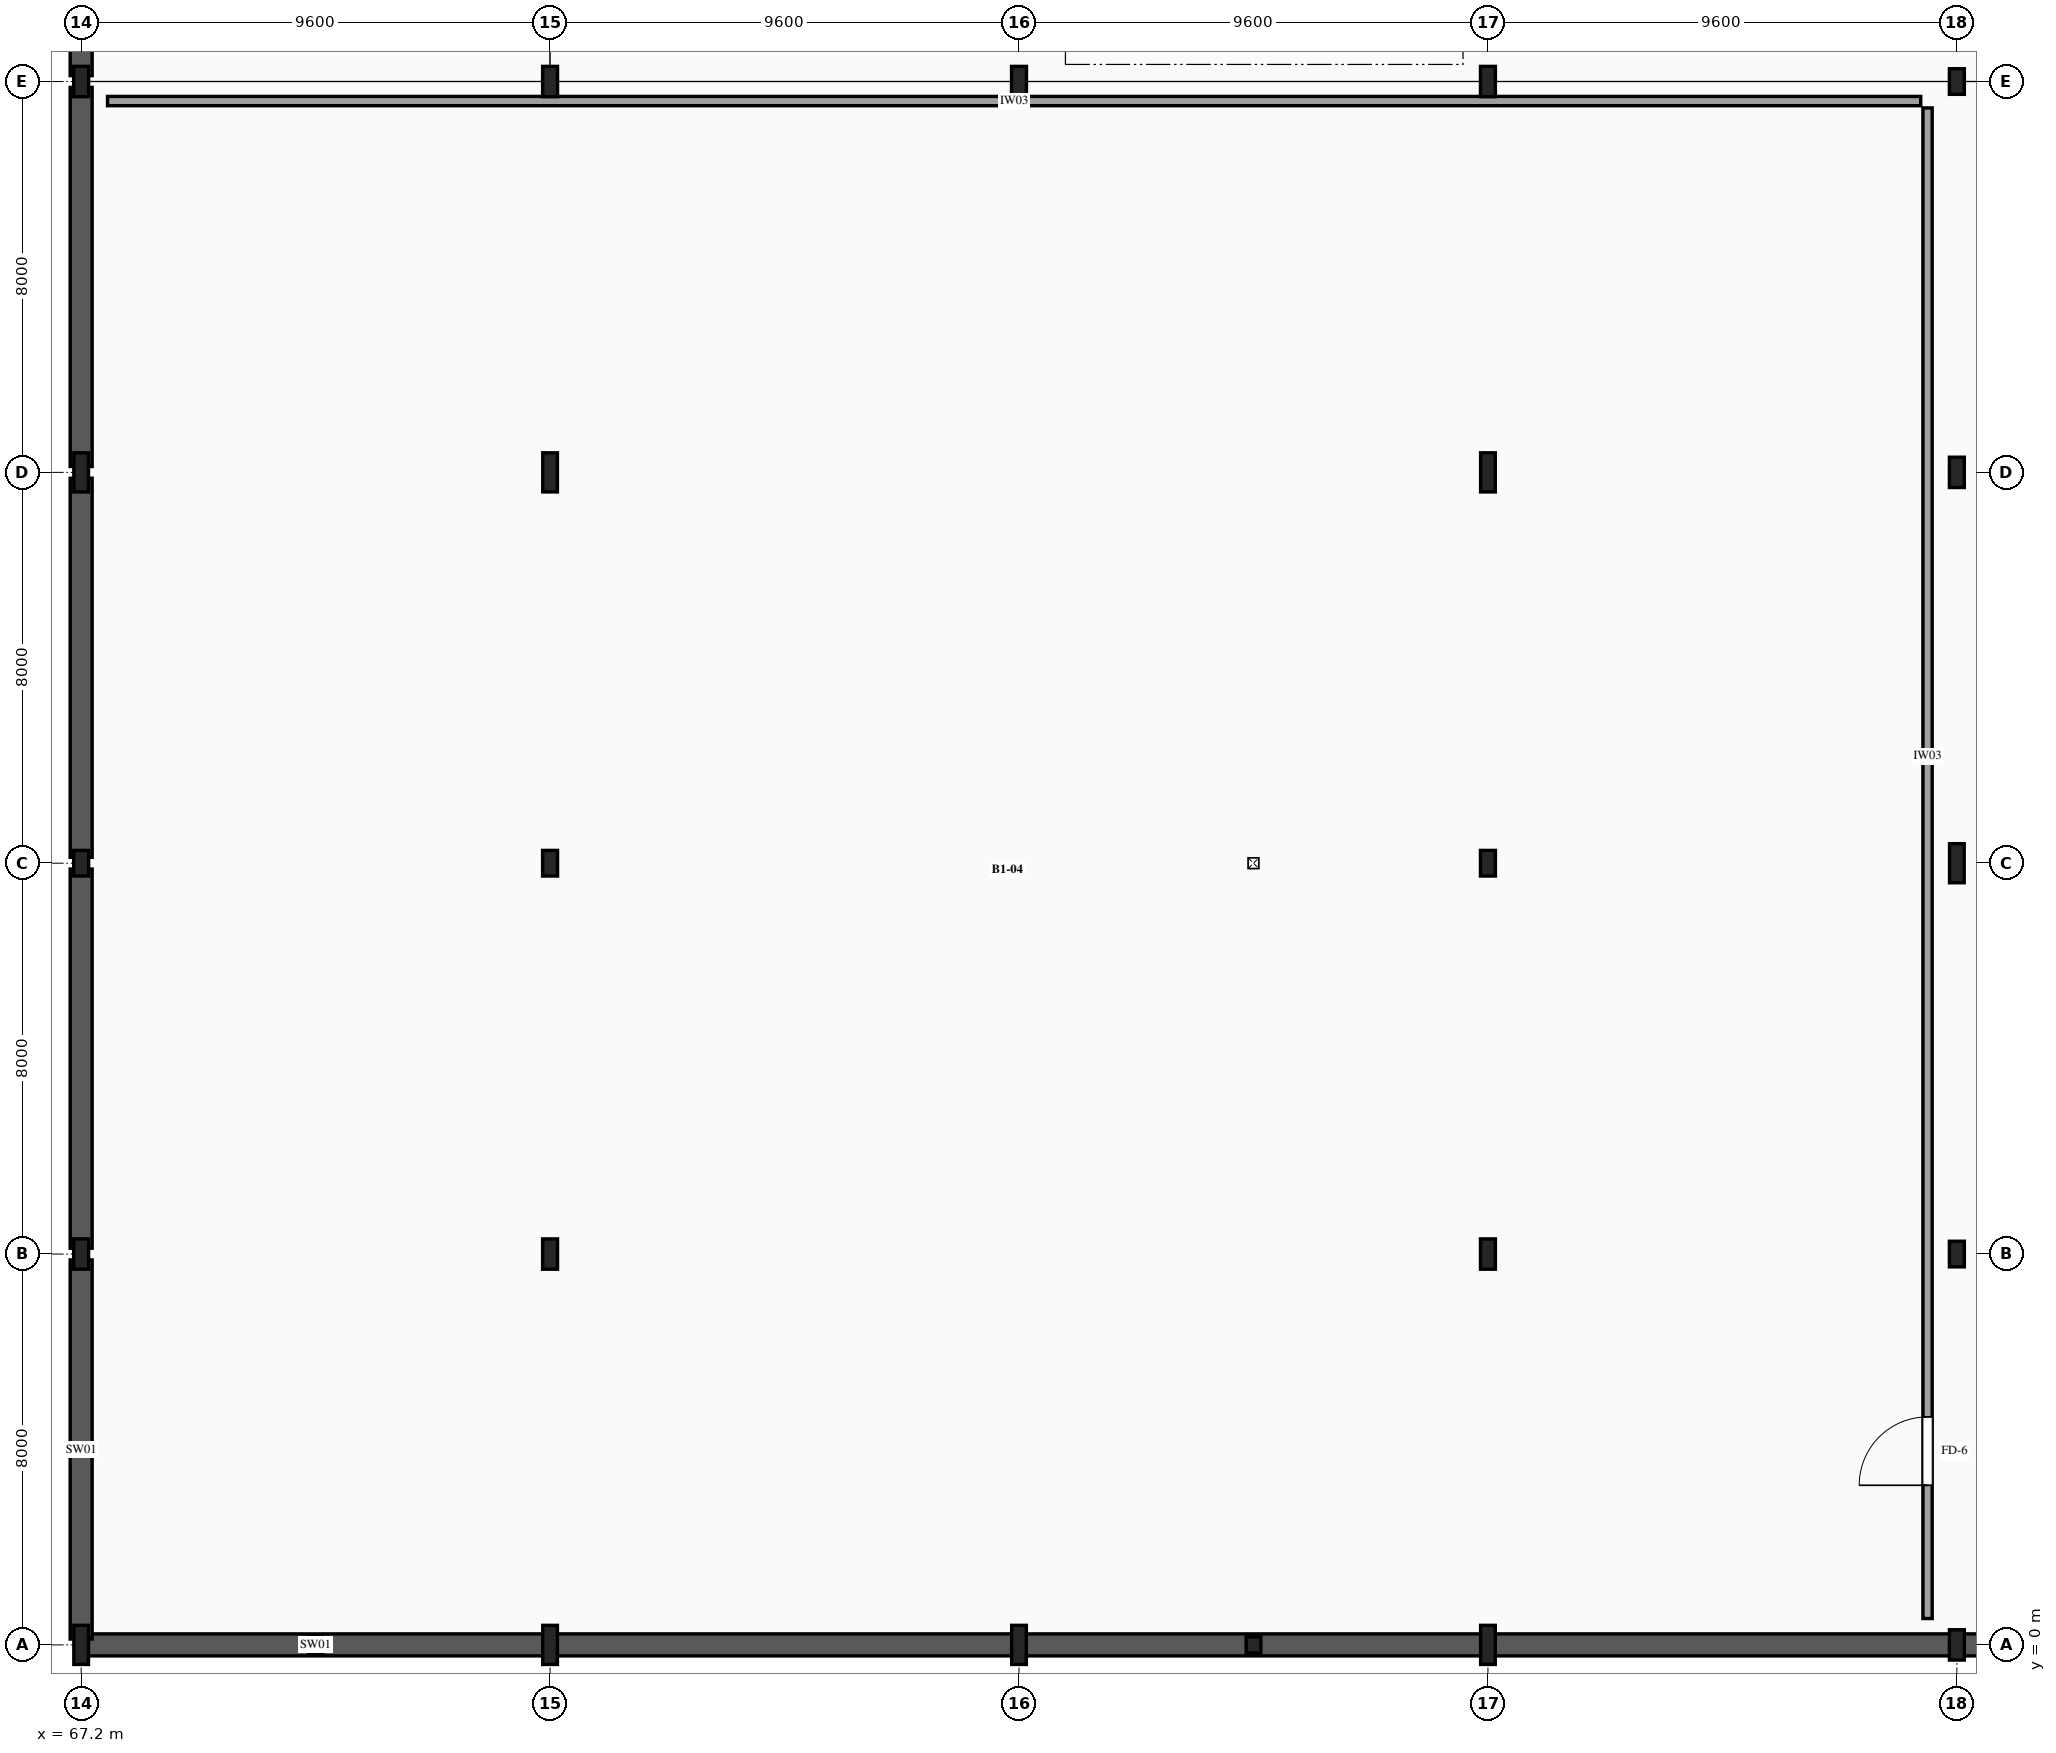
"""IFC4 building model, lengths in metres.
Left out: names, types, materials, properties, quantities, classifications, styles, units other than length and angle.
Written with IfcOpenShell. Run it as: python <this file> out.ifc"""

import sys

from ifc_helpers import new_model, si_unit, direction, frame, frame_2d, origin, origin_2d, place, context, subcontext, project, spatial, rectangle, i_section, extrude, element, fill, save


model = new_model("IFC4")
c1 = context("Model", 3, precision=1e-05, world=origin(), true_north=direction((0.0, 1.0)))
c2 = subcontext(c1, "Body", "Model", "MODEL_VIEW")
j1 = project(units=[si_unit("LENGTHUNIT", "METRE"), si_unit("PLANEANGLEUNIT", "RADIAN")], contexts=[c1])
p1 = place(None, origin())
s1 = spatial("IfcSite", under=j1, at=p1, CompositionType="ELEMENT")
p2 = place(p1, origin())
s2 = spatial("IfcBuilding", under=s1, at=p2, CompositionType="ELEMENT")
p3 = place(p2, frame((0.0, 0.0, -4.5)))
s3 = spatial("IfcBuildingStorey", under=s2, at=p3, CompositionType="ELEMENT", Elevation=-4.5)
p4 = place(p3, frame((67.2, 0.0, 0.0), z_axis=(0.0, 0.0, 1.0), x_axis=(1.0, 0.0, 0.0)))
e1 = element("IfcColumn", 1, at=p4, inside=s3, PredefinedType="COLUMN", context=c2, shape_type="SweptSolid", body=[
    extrude(i_section(OverallWidth=0.3, OverallDepth=0.8, WebThickness=0.018, FlangeThickness=0.033, FilletRadius=0.03, at=origin_2d()), origin(), (0.0, 0.0, 1.0), 4.22),
])
p5 = place(p3, frame((67.2, 8.0, 0.0), z_axis=(0.0, 0.0, 1.0), x_axis=(1.0, 0.0, 0.0)))
e2 = element("IfcColumn", 2, at=p5, inside=s3, PredefinedType="COLUMN", context=c2, shape_type="SweptSolid", body=[
    extrude(i_section(OverallWidth=0.305, OverallDepth=0.62, WebThickness=0.021, FlangeThickness=0.04, FilletRadius=0.027, at=origin_2d()), origin(), (0.0, 0.0, 1.0), 4.22),
])
p6 = place(p3, frame((67.2, 16.0, 0.0), z_axis=(0.0, 0.0, 1.0), x_axis=(1.0, 0.0, 0.0)))
e3 = element("IfcColumn", 3, at=p6, inside=s3, PredefinedType="COLUMN", context=c2, shape_type="SweptSolid", body=[
    extrude(i_section(OverallWidth=0.306, OverallDepth=0.524, WebThickness=0.021, FlangeThickness=0.04, FilletRadius=0.027, at=origin_2d()), origin(), (0.0, 0.0, 1.0), 4.22),
])
p7 = place(p3, frame((67.2, 24.0, 0.0), z_axis=(0.0, 0.0, 1.0), x_axis=(1.0, 0.0, 0.0)))
e4 = element("IfcColumn", 4, at=p7, inside=s3, PredefinedType="COLUMN", context=c2, shape_type="SweptSolid", body=[
    extrude(i_section(OverallWidth=0.3, OverallDepth=0.8, WebThickness=0.018, FlangeThickness=0.033, FilletRadius=0.03, at=origin_2d()), origin(), (0.0, 0.0, 1.0), 4.22),
])
p8 = place(p3, frame((67.2, 32.0, 0.0), z_axis=(0.0, 0.0, 1.0), x_axis=(1.0, 0.0, 0.0)))
e5 = element("IfcColumn", 5, at=p8, inside=s3, PredefinedType="COLUMN", context=c2, shape_type="SweptSolid", body=[
    extrude(i_section(OverallWidth=0.305, OverallDepth=0.62, WebThickness=0.021, FlangeThickness=0.04, FilletRadius=0.027, at=origin_2d()), origin(), (0.0, 0.0, 1.0), 4.22),
])
p9 = place(p3, frame((76.8, 0.0, 0.0), z_axis=(0.0, 0.0, 1.0), x_axis=(1.0, 0.0, 0.0)))
e6 = element("IfcColumn", 6, at=p9, inside=s3, PredefinedType="COLUMN", context=c2, shape_type="SweptSolid", body=[
    extrude(i_section(OverallWidth=0.3, OverallDepth=0.8, WebThickness=0.018, FlangeThickness=0.033, FilletRadius=0.03, at=origin_2d()), origin(), (0.0, 0.0, 1.0), 4.22),
])
p10 = place(p3, frame((76.8, 8.0, 0.0), z_axis=(0.0, 0.0, 1.0), x_axis=(1.0, 0.0, 0.0)))
e7 = element("IfcColumn", 7, at=p10, inside=s3, PredefinedType="COLUMN", context=c2, shape_type="SweptSolid", body=[
    extrude(i_section(OverallWidth=0.305, OverallDepth=0.62, WebThickness=0.021, FlangeThickness=0.04, FilletRadius=0.027, at=origin_2d()), origin(), (0.0, 0.0, 1.0), 4.22),
])
p11 = place(p3, frame((76.8, 16.0, 0.0), z_axis=(0.0, 0.0, 1.0), x_axis=(1.0, 0.0, 0.0)))
e8 = element("IfcColumn", 8, at=p11, inside=s3, PredefinedType="COLUMN", context=c2, shape_type="SweptSolid", body=[
    extrude(i_section(OverallWidth=0.306, OverallDepth=0.524, WebThickness=0.021, FlangeThickness=0.04, FilletRadius=0.027, at=origin_2d()), origin(), (0.0, 0.0, 1.0), 4.22),
])
p12 = place(p3, frame((76.8, 24.0, 0.0), z_axis=(0.0, 0.0, 1.0), x_axis=(1.0, 0.0, 0.0)))
e9 = element("IfcColumn", 9, at=p12, inside=s3, PredefinedType="COLUMN", context=c2, shape_type="SweptSolid", body=[
    extrude(i_section(OverallWidth=0.3, OverallDepth=0.8, WebThickness=0.018, FlangeThickness=0.033, FilletRadius=0.03, at=origin_2d()), origin(), (0.0, 0.0, 1.0), 4.22),
])
p13 = place(p3, frame((76.8, 32.0, 0.0), z_axis=(0.0, 0.0, 1.0), x_axis=(1.0, 0.0, 0.0)))
e10 = element("IfcColumn", 10, at=p13, inside=s3, PredefinedType="COLUMN", context=c2, shape_type="SweptSolid", body=[
    extrude(i_section(OverallWidth=0.305, OverallDepth=0.62, WebThickness=0.021, FlangeThickness=0.04, FilletRadius=0.027, at=origin_2d()), origin(), (0.0, 0.0, 1.0), 4.22),
])
p14 = place(p3, frame((86.4, 0.0, 0.0), z_axis=(0.0, 0.0, 1.0), x_axis=(1.0, 0.0, 0.0)))
e11 = element("IfcColumn", 11, at=p14, inside=s3, PredefinedType="COLUMN", context=c2, shape_type="SweptSolid", body=[
    extrude(i_section(OverallWidth=0.3, OverallDepth=0.8, WebThickness=0.018, FlangeThickness=0.033, FilletRadius=0.03, at=origin_2d()), origin(), (0.0, 0.0, 1.0), 4.22),
])
p15 = place(p3, frame((86.4, 32.0, 0.0), z_axis=(0.0, 0.0, 1.0), x_axis=(1.0, 0.0, 0.0)))
e12 = element("IfcColumn", 12, at=p15, inside=s3, PredefinedType="COLUMN", context=c2, shape_type="SweptSolid", body=[
    extrude(i_section(OverallWidth=0.305, OverallDepth=0.62, WebThickness=0.021, FlangeThickness=0.04, FilletRadius=0.027, at=origin_2d()), origin(), (0.0, 0.0, 1.0), 4.22),
])
p16 = place(p3, frame((96.0, 0.0, 0.0), z_axis=(0.0, 0.0, 1.0), x_axis=(1.0, 0.0, 0.0)))
e13 = element("IfcColumn", 13, at=p16, inside=s3, PredefinedType="COLUMN", context=c2, shape_type="SweptSolid", body=[
    extrude(i_section(OverallWidth=0.3, OverallDepth=0.8, WebThickness=0.018, FlangeThickness=0.033, FilletRadius=0.03, at=origin_2d()), origin(), (0.0, 0.0, 1.0), 4.22),
])
p17 = place(p3, frame((96.0, 8.0, 0.0), z_axis=(0.0, 0.0, 1.0), x_axis=(1.0, 0.0, 0.0)))
e14 = element("IfcColumn", 14, at=p17, inside=s3, PredefinedType="COLUMN", context=c2, shape_type="SweptSolid", body=[
    extrude(i_section(OverallWidth=0.305, OverallDepth=0.62, WebThickness=0.021, FlangeThickness=0.04, FilletRadius=0.027, at=origin_2d()), origin(), (0.0, 0.0, 1.0), 4.22),
])
p18 = place(p3, frame((96.0, 16.0, 0.0), z_axis=(0.0, 0.0, 1.0), x_axis=(1.0, 0.0, 0.0)))
e15 = element("IfcColumn", 15, at=p18, inside=s3, PredefinedType="COLUMN", context=c2, shape_type="SweptSolid", body=[
    extrude(i_section(OverallWidth=0.306, OverallDepth=0.524, WebThickness=0.021, FlangeThickness=0.04, FilletRadius=0.027, at=origin_2d()), origin(), (0.0, 0.0, 1.0), 4.22),
])
p19 = place(p3, frame((96.0, 24.0, 0.0), z_axis=(0.0, 0.0, 1.0), x_axis=(1.0, 0.0, 0.0)))
e16 = element("IfcColumn", 16, at=p19, inside=s3, PredefinedType="COLUMN", context=c2, shape_type="SweptSolid", body=[
    extrude(i_section(OverallWidth=0.3, OverallDepth=0.8, WebThickness=0.018, FlangeThickness=0.033, FilletRadius=0.03, at=origin_2d()), origin(), (0.0, 0.0, 1.0), 4.22),
])
for number, where, z_axis, x_axis in (
    (17, (96.0, 32.0, 0.0), (0.0, 0.0, 1.0), (1.0, 0.0, 0.0)),
    (18, (105.6, 0.0, 0.0), (0.0, 0.0, 1.0), (1.0, 0.0, 0.0)),
):
    element("IfcColumn", number, at=place(p3, frame(where, z_axis=z_axis, x_axis=x_axis)), inside=s3, PredefinedType="COLUMN", context=c2, shape_type="SweptSolid", body=[
        extrude(i_section(OverallWidth=0.305, OverallDepth=0.62, WebThickness=0.021, FlangeThickness=0.04, FilletRadius=0.027, at=origin_2d()), origin(), (0.0, 0.0, 1.0), 4.22),
    ])
p20 = place(p3, frame((105.6, 8.0, 0.0), z_axis=(0.0, 0.0, 1.0), x_axis=(1.0, 0.0, 0.0)))
e19 = element("IfcColumn", 19, at=p20, inside=s3, PredefinedType="COLUMN", context=c2, shape_type="SweptSolid", body=[
    extrude(i_section(OverallWidth=0.306, OverallDepth=0.524, WebThickness=0.021, FlangeThickness=0.04, FilletRadius=0.027, at=origin_2d()), origin(), (0.0, 0.0, 1.0), 4.22),
])
p21 = place(p3, frame((105.6, 16.0, 0.0), z_axis=(0.0, 0.0, 1.0), x_axis=(1.0, 0.0, 0.0)))
e20 = element("IfcColumn", 20, at=p21, inside=s3, PredefinedType="COLUMN", context=c2, shape_type="SweptSolid", body=[
    extrude(i_section(OverallWidth=0.3, OverallDepth=0.8, WebThickness=0.018, FlangeThickness=0.033, FilletRadius=0.03, at=origin_2d()), origin(), (0.0, 0.0, 1.0), 4.22),
])
p22 = place(p3, frame((105.6, 24.0, 0.0), z_axis=(0.0, 0.0, 1.0), x_axis=(1.0, 0.0, 0.0)))
e21 = element("IfcColumn", 21, at=p22, inside=s3, PredefinedType="COLUMN", context=c2, shape_type="SweptSolid", body=[
    extrude(i_section(OverallWidth=0.305, OverallDepth=0.62, WebThickness=0.021, FlangeThickness=0.04, FilletRadius=0.027, at=origin_2d()), origin(), (0.0, 0.0, 1.0), 4.22),
])
p23 = place(p3, frame((105.6, 32.0, 0.0), z_axis=(0.0, 0.0, 1.0), x_axis=(1.0, 0.0, 0.0)))
e22 = element("IfcColumn", 22, at=p23, inside=s3, PredefinedType="COLUMN", context=c2, shape_type="SweptSolid", body=[
    extrude(i_section(OverallWidth=0.306, OverallDepth=0.524, WebThickness=0.021, FlangeThickness=0.04, FilletRadius=0.027, at=origin_2d()), origin(), (0.0, 0.0, 1.0), 4.22),
])
for number, where, z_axis, x_axis in (
    (23, (72.0, 0.0, 0.0), (0.0, 0.0, 1.0), (1.0, 0.0, 0.0)),
    (24, (91.2, 0.0, 0.0), (0.0, 0.0, 1.0), (1.0, 0.0, 0.0)),
):
    element("IfcColumn", number, at=place(p3, frame(where, z_axis=z_axis, x_axis=x_axis)), inside=s3, PredefinedType="PILASTER", context=c2, shape_type="SweptSolid", body=[
        extrude(i_section(OverallWidth=0.3, OverallDepth=0.33, WebThickness=0.01, FlangeThickness=0.017, FilletRadius=0.027, at=origin_2d()), origin(), (0.0, 0.0, 1.0), 4.22),
    ])
p24 = place(p3, frame((67.32, 0.0, 0.0), z_axis=(0.0, 0.0, 1.0), x_axis=(1.0, 0.0, 0.0)))
e25 = element("IfcWall", 25, at=p24, inside=s3, PredefinedType="SHEAR", context=c2, shape_type="SweptSolid", body=[
    extrude(rectangle(XDim=9.36, YDim=0.45, at=frame_2d((4.68, 0.0))), origin(), (0.0, 0.0, 1.0), 4.22),
])
p25 = place(p3, frame((76.92, 0.0, 0.0), z_axis=(0.0, 0.0, 1.0), x_axis=(1.0, 0.0, 0.0)))
e26 = element("IfcWall", 26, at=p25, inside=s3, PredefinedType="SHEAR", context=c2, shape_type="SweptSolid", body=[
    extrude(rectangle(XDim=9.36, YDim=0.45, at=frame_2d((4.68, 0.0))), origin(), (0.0, 0.0, 1.0), 4.22),
])
for number, where, z_axis, x_axis in (
    (27, (86.52, 0.0, 0.0), (0.0, 0.0, 1.0), (1.0, 0.0, 0.0)),
    (28, (96.12, 0.0, 0.0), (0.0, 0.0, 1.0), (1.0, 0.0, 0.0)),
):
    element("IfcWall", number, at=place(p3, frame(where, z_axis=z_axis, x_axis=x_axis)), inside=s3, PredefinedType="SHEAR", context=c2, shape_type="SweptSolid", body=[
        extrude(rectangle(XDim=9.36, YDim=0.45, at=frame_2d((4.68, 0.0))), origin(), (0.0, 0.0, 1.0), 4.22),
    ])
p26 = place(p3, frame((105.72, 0.0, 0.0), z_axis=(0.0, 0.0, 1.0), x_axis=(1.0, 0.0, 0.0)))
e29 = element("IfcWall", 29, at=p26, inside=s3, PredefinedType="SHEAR", context=c2, shape_type="SweptSolid", body=[
    extrude(rectangle(XDim=9.36, YDim=0.45, at=frame_2d((4.68, 0.0))), origin(), (0.0, 0.0, 1.0), 4.22),
])
for number, where, z_axis, x_axis in (
    (30, (67.2, 0.12, 0.0), (0.0, 0.0, 1.0), (0.0, 1.0, 0.0)),
    (31, (67.2, 8.12, 0.0), (0.0, 0.0, 1.0), (0.0, 1.0, 0.0)),
    (32, (67.2, 16.12, 0.0), (0.0, 0.0, 1.0), (0.0, 1.0, 0.0)),
    (33, (67.2, 24.12, 0.0), (0.0, 0.0, 1.0), (0.0, 1.0, 0.0)),
    (34, (67.2, 32.12, 0.0), (0.0, 0.0, 1.0), (0.0, 1.0, 0.0)),
):
    element("IfcWall", number, at=place(p3, frame(where, z_axis=z_axis, x_axis=x_axis)), inside=s3, PredefinedType="SHEAR", context=c2, shape_type="SweptSolid", body=[
        extrude(rectangle(XDim=7.76, YDim=0.45, at=frame_2d((3.88, 0.0))), origin(), (0.0, 0.0, 1.0), 4.22),
    ])
p27 = place(p3, frame((67.74, 31.6, 0.0), z_axis=(0.0, 0.0, 1.0), x_axis=(1.0, 0.0, 0.0)))
e35 = element("IfcWall", 35, at=p27, inside=s3, PredefinedType="SOLIDWALL", context=c2, shape_type="SweptSolid", body=[
    extrude(rectangle(XDim=37.12, YDim=0.19, at=frame_2d((18.56, 0.0))), origin(), (0.0, 0.0, 1.0), 3.58),
])
p28 = place(p3, frame((105.0, 0.54, 0.0), z_axis=(0.0, 0.0, 1.0), x_axis=(0.0, 1.0, 0.0)))
e36 = element("IfcWall", 36, at=p28, inside=s3, PredefinedType="SOLIDWALL", context=c2, shape_type="SweptSolid", body=[
    extrude(rectangle(XDim=30.92, YDim=0.19, at=frame_2d((15.46, 0.0))), origin(), (0.0, 0.0, 1.0), 3.58),
])
p29 = place(p28, frame((2.727, 0.0, 0.0)))
e37 = element("IfcOpeningElement", 37, at=p29, cuts=e36, PredefinedType="OPENING", context=c2, shape_type="SweptSolid", body=[
    extrude(rectangle(XDim=1.4, YDim=2.15, at=frame_2d((0.7, 1.075))), frame((0.0, 0.105, 0.0), z_axis=(0.0, -1.0, 0.0), x_axis=(1.0, 0.0, 0.0)), (0.0, 0.0, 1.0), 0.21),
])
p30 = place(p29, origin())
e38 = element("IfcDoor", 38, at=p30, inside=s3, OperationType="SINGLE_SWING_LEFT", PredefinedType="DOOR", context=c2, shape_type="SweptSolid", body=[
    extrude(rectangle(XDim=1.4, YDim=2.15, at=frame_2d((0.7, 1.075))), frame((0.0, 0.025, 0.0), z_axis=(0.0, -1.0, 0.0), x_axis=(1.0, 0.0, 0.0)), (0.0, 0.0, 1.0), 0.05),
])
fill(e37, e38)
save(model, sys.argv[1])
